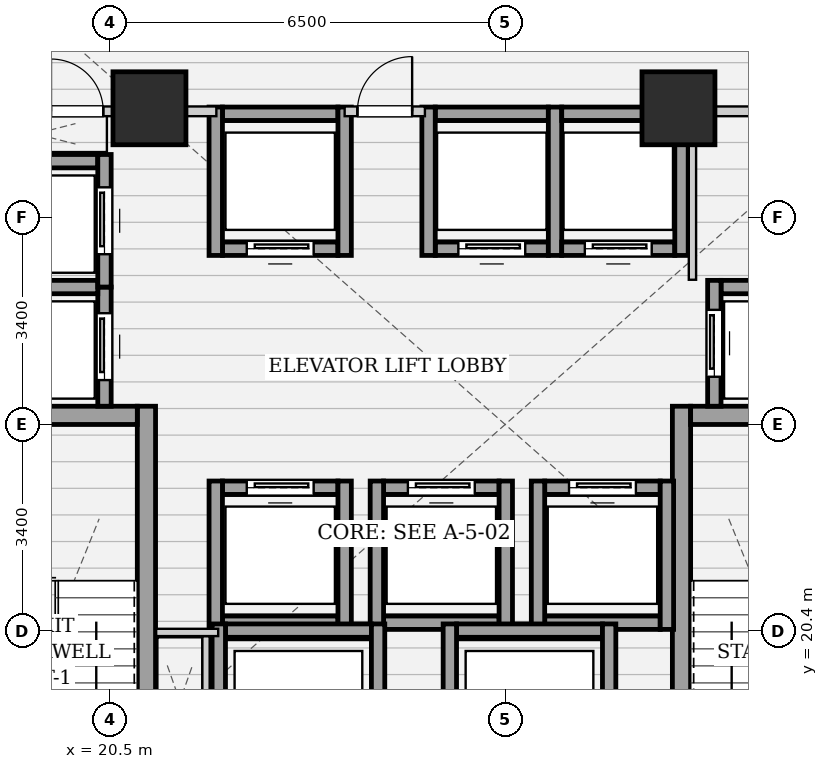
"""IFC4 building model, lengths in metres.
Left out: names, types, materials, properties, quantities, classifications, styles, units other than length and angle.
Written with IfcOpenShell. Run it as: python <this file> out.ifc"""

import sys

from ifc_helpers import new_model, si_unit, direction, frame, frame_2d, origin, origin_2d, place, context, subcontext, project, spatial, rectangle, extrude, element, fill, save


model = new_model("IFC4")
c1 = context("Model", 3, precision=1e-05, world=origin(), true_north=direction((0.0, 1.0)))
c2 = subcontext(c1, "Body", "Model", "MODEL_VIEW")
j1 = project(units=[si_unit("LENGTHUNIT", "METRE"), si_unit("PLANEANGLEUNIT", "RADIAN")], contexts=[c1])
p1 = place(None, origin())
s1 = spatial("IfcSite", under=j1, at=p1, CompositionType="ELEMENT")
p2 = place(p1, origin())
s2 = spatial("IfcBuilding", under=s1, at=p2, CompositionType="ELEMENT")
p3 = place(p2, origin())
s3 = spatial("IfcBuildingStorey", under=s2, at=p3, CompositionType="ELEMENT", Elevation=0.0)
for number, where, z_axis, x_axis in (
    (1, (21.15, 29.0, 0.0), (0.0, 0.0, 1.0), (1.0, 0.0, 0.0)),
    (2, (29.85, 29.0, 0.0), (0.0, 0.0, 1.0), (1.0, 0.0, 0.0)),
):
    element("IfcColumn", number, at=place(p3, frame(where, z_axis=z_axis, x_axis=x_axis)), inside=s3, PredefinedType="COLUMN", context=c2, shape_type="SweptSolid", body=[
        extrude(rectangle(XDim=1.2, YDim=1.2, at=origin_2d()), origin(), (0.0, 0.0, 1.0), 6.0),
    ])
p4 = place(p3, frame((21.1, 15.1, 0.0), z_axis=(0.0, 0.0, 1.0), x_axis=(0.0, 1.0, 0.0)))
e3 = element("IfcWall", 3, at=p4, inside=s3, PredefinedType="SHEAR", context=c2, shape_type="SweptSolid", body=[
    extrude(rectangle(XDim=9.0, YDim=0.3, at=frame_2d((4.5, 0.0))), origin(), (0.0, 0.0, 1.0), 5.68),
])
p5 = place(p3, frame((18.1, 23.95, 0.0), z_axis=(0.0, 0.0, 1.0), x_axis=(1.0, 0.0, 0.0)))
e4 = element("IfcWall", 4, at=p5, inside=s3, PredefinedType="SHEAR", context=c2, shape_type="SweptSolid", body=[
    extrude(rectangle(XDim=2.85, YDim=0.3, at=frame_2d((1.425, 0.0))), origin(), (0.0, 0.0, 1.0), 5.68),
])
p6 = place(p3, frame((29.9, 15.1, 0.0), z_axis=(0.0, 0.0, 1.0), x_axis=(0.0, 1.0, 0.0)))
e5 = element("IfcWall", 5, at=p6, inside=s3, PredefinedType="SHEAR", context=c2, shape_type="SweptSolid", body=[
    extrude(rectangle(XDim=9.0, YDim=0.3, at=frame_2d((4.5, 0.0))), origin(), (0.0, 0.0, 1.0), 5.68),
])
p7 = place(p3, frame((30.05, 23.95, 0.0), z_axis=(0.0, 0.0, 1.0), x_axis=(1.0, 0.0, 0.0)))
e6 = element("IfcWall", 6, at=p7, inside=s3, PredefinedType="SHEAR", context=c2, shape_type="SweptSolid", body=[
    extrude(rectangle(XDim=2.85, YDim=0.3, at=frame_2d((1.425, 0.0))), origin(), (0.0, 0.0, 1.0), 5.68),
])
p8 = place(p3, frame((22.35, 26.69, 0.0), z_axis=(0.0, 0.0, 1.0), x_axis=(1.0, 0.0, 0.0)))
e7 = element("IfcWall", 7, at=p8, inside=s3, PredefinedType="SHEAR", context=c2, shape_type="SweptSolid", body=[
    extrude(rectangle(XDim=1.9, YDim=0.22, at=frame_2d((0.95, 0.0))), origin(), (0.0, 0.0, 1.0), 5.68),
])
p9 = place(p8, frame((0.4, 0.0, 0.0)))
e8 = element("IfcOpeningElement", 8, at=p9, cuts=e7, PredefinedType="OPENING", context=c2, shape_type="SweptSolid", body=[
    extrude(rectangle(XDim=1.1, YDim=2.15, at=frame_2d((0.55, 1.075))), frame((0.0, 0.12, 0.0), z_axis=(0.0, -1.0, 0.0), x_axis=(1.0, 0.0, 0.0)), (0.0, 0.0, 1.0), 0.24),
])
p10 = place(p3, frame((22.35, 28.91, 0.0), z_axis=(0.0, 0.0, 1.0), x_axis=(1.0, 0.0, 0.0)))
e9 = element("IfcWall", 9, at=p10, inside=s3, PredefinedType="SHEAR", context=c2, shape_type="SweptSolid", body=[
    extrude(rectangle(XDim=1.9, YDim=0.22, at=frame_2d((0.95, 0.0))), origin(), (0.0, 0.0, 1.0), 5.68),
])
for number, where, z_axis, x_axis in (
    (10, (22.24, 26.58, 0.0), (0.0, 0.0, 1.0), (0.0, 1.0, 0.0)),
    (11, (24.36, 26.58, 0.0), (0.0, 0.0, 1.0), (0.0, 1.0, 0.0)),
):
    element("IfcWall", number, at=place(p3, frame(where, z_axis=z_axis, x_axis=x_axis)), inside=s3, PredefinedType="SHEAR", context=c2, shape_type="SweptSolid", body=[
        extrude(rectangle(XDim=2.44, YDim=0.22, at=frame_2d((1.22, 0.0))), origin(), (0.0, 0.0, 1.0), 5.68),
    ])
p11 = place(p3, frame((25.85, 26.69, 0.0), z_axis=(0.0, 0.0, 1.0), x_axis=(1.0, 0.0, 0.0)))
e12 = element("IfcWall", 12, at=p11, inside=s3, PredefinedType="SHEAR", context=c2, shape_type="SweptSolid", body=[
    extrude(rectangle(XDim=1.86, YDim=0.22, at=frame_2d((0.93, 0.0))), origin(), (0.0, 0.0, 1.0), 5.68),
])
p12 = place(p11, frame((0.38, 0.0, 0.0)))
e13 = element("IfcOpeningElement", 13, at=p12, cuts=e12, PredefinedType="OPENING", context=c2, shape_type="SweptSolid", body=[
    extrude(rectangle(XDim=1.1, YDim=2.15, at=frame_2d((0.55, 1.075))), frame((0.0, 0.12, 0.0), z_axis=(0.0, -1.0, 0.0), x_axis=(1.0, 0.0, 0.0)), (0.0, 0.0, 1.0), 0.24),
])
p13 = place(p3, frame((25.85, 28.91, 0.0), z_axis=(0.0, 0.0, 1.0), x_axis=(1.0, 0.0, 0.0)))
e14 = element("IfcWall", 14, at=p13, inside=s3, PredefinedType="SHEAR", context=c2, shape_type="SweptSolid", body=[
    extrude(rectangle(XDim=1.86, YDim=0.22, at=frame_2d((0.93, 0.0))), origin(), (0.0, 0.0, 1.0), 5.68),
])
for number, where, z_axis, x_axis in (
    (15, (25.74, 26.58, 0.0), (0.0, 0.0, 1.0), (0.0, 1.0, 0.0)),
    (16, (27.82, 26.58, 0.0), (0.0, 0.0, 1.0), (0.0, 1.0, 0.0)),
):
    element("IfcWall", number, at=place(p3, frame(where, z_axis=z_axis, x_axis=x_axis)), inside=s3, PredefinedType="SHEAR", context=c2, shape_type="SweptSolid", body=[
        extrude(rectangle(XDim=2.44, YDim=0.22, at=frame_2d((1.22, 0.0))), origin(), (0.0, 0.0, 1.0), 5.68),
    ])
p14 = place(p3, frame((27.93, 26.69, 0.0), z_axis=(0.0, 0.0, 1.0), x_axis=(1.0, 0.0, 0.0)))
e17 = element("IfcWall", 17, at=p14, inside=s3, PredefinedType="SHEAR", context=c2, shape_type="SweptSolid", body=[
    extrude(rectangle(XDim=1.86, YDim=0.22, at=frame_2d((0.93, 0.0))), origin(), (0.0, 0.0, 1.0), 5.68),
])
p15 = place(p14, frame((0.38, 0.0, 0.0)))
e18 = element("IfcOpeningElement", 18, at=p15, cuts=e17, PredefinedType="OPENING", context=c2, shape_type="SweptSolid", body=[
    extrude(rectangle(XDim=1.1, YDim=2.15, at=frame_2d((0.55, 1.075))), frame((0.0, 0.12, 0.0), z_axis=(0.0, -1.0, 0.0), x_axis=(1.0, 0.0, 0.0)), (0.0, 0.0, 1.0), 0.24),
])
p16 = place(p3, frame((27.93, 28.91, 0.0), z_axis=(0.0, 0.0, 1.0), x_axis=(1.0, 0.0, 0.0)))
e19 = element("IfcWall", 19, at=p16, inside=s3, PredefinedType="SHEAR", context=c2, shape_type="SweptSolid", body=[
    extrude(rectangle(XDim=1.86, YDim=0.22, at=frame_2d((0.93, 0.0))), origin(), (0.0, 0.0, 1.0), 5.68),
])
p17 = place(p3, frame((29.9, 26.58, 0.0), z_axis=(0.0, 0.0, 1.0), x_axis=(0.0, 1.0, 0.0)))
e20 = element("IfcWall", 20, at=p17, inside=s3, PredefinedType="SHEAR", context=c2, shape_type="SweptSolid", body=[
    extrude(rectangle(XDim=2.44, YDim=0.22, at=frame_2d((1.22, 0.0))), origin(), (0.0, 0.0, 1.0), 5.68),
])
p18 = place(p3, frame((22.35, 20.54, 0.0), z_axis=(0.0, 0.0, 1.0), x_axis=(1.0, 0.0, 0.0)))
e21 = element("IfcWall", 21, at=p18, inside=s3, PredefinedType="SHEAR", context=c2, shape_type="SweptSolid", body=[
    extrude(rectangle(XDim=1.9, YDim=0.22, at=frame_2d((0.95, 0.0))), origin(), (0.0, 0.0, 1.0), 5.68),
])
p19 = place(p3, frame((22.35, 22.76, 0.0), z_axis=(0.0, 0.0, 1.0), x_axis=(1.0, 0.0, 0.0)))
e22 = element("IfcWall", 22, at=p19, inside=s3, PredefinedType="SHEAR", context=c2, shape_type="SweptSolid", body=[
    extrude(rectangle(XDim=1.9, YDim=0.22, at=frame_2d((0.95, 0.0))), origin(), (0.0, 0.0, 1.0), 5.68),
])
p20 = place(p19, frame((0.4, 0.0, 0.0)))
e23 = element("IfcOpeningElement", 23, at=p20, cuts=e22, PredefinedType="OPENING", context=c2, shape_type="SweptSolid", body=[
    extrude(rectangle(XDim=1.1, YDim=2.15, at=frame_2d((0.55, 1.075))), frame((0.0, 0.12, 0.0), z_axis=(0.0, -1.0, 0.0), x_axis=(1.0, 0.0, 0.0)), (0.0, 0.0, 1.0), 0.24),
])
for number, where, z_axis, x_axis in (
    (24, (22.24, 20.43, 0.0), (0.0, 0.0, 1.0), (0.0, 1.0, 0.0)),
    (25, (24.36, 20.43, 0.0), (0.0, 0.0, 1.0), (0.0, 1.0, 0.0)),
):
    element("IfcWall", number, at=place(p3, frame(where, z_axis=z_axis, x_axis=x_axis)), inside=s3, PredefinedType="SHEAR", context=c2, shape_type="SweptSolid", body=[
        extrude(rectangle(XDim=2.44, YDim=0.22, at=frame_2d((1.22, 0.0))), origin(), (0.0, 0.0, 1.0), 5.68),
    ])
p21 = place(p3, frame((25.0, 20.54, 0.0), z_axis=(0.0, 0.0, 1.0), x_axis=(1.0, 0.0, 0.0)))
e26 = element("IfcWall", 26, at=p21, inside=s3, PredefinedType="SHEAR", context=c2, shape_type="SweptSolid", body=[
    extrude(rectangle(XDim=1.9, YDim=0.22, at=frame_2d((0.95, 0.0))), origin(), (0.0, 0.0, 1.0), 5.68),
])
p22 = place(p3, frame((25.0, 22.76, 0.0), z_axis=(0.0, 0.0, 1.0), x_axis=(1.0, 0.0, 0.0)))
e27 = element("IfcWall", 27, at=p22, inside=s3, PredefinedType="SHEAR", context=c2, shape_type="SweptSolid", body=[
    extrude(rectangle(XDim=1.9, YDim=0.22, at=frame_2d((0.95, 0.0))), origin(), (0.0, 0.0, 1.0), 5.68),
])
p23 = place(p22, frame((0.4, 0.0, 0.0)))
e28 = element("IfcOpeningElement", 28, at=p23, cuts=e27, PredefinedType="OPENING", context=c2, shape_type="SweptSolid", body=[
    extrude(rectangle(XDim=1.1, YDim=2.15, at=frame_2d((0.55, 1.075))), frame((0.0, 0.12, 0.0), z_axis=(0.0, -1.0, 0.0), x_axis=(1.0, 0.0, 0.0)), (0.0, 0.0, 1.0), 0.24),
])
for number, where, z_axis, x_axis in (
    (29, (24.89, 20.43, 0.0), (0.0, 0.0, 1.0), (0.0, 1.0, 0.0)),
    (30, (27.01, 20.43, 0.0), (0.0, 0.0, 1.0), (0.0, 1.0, 0.0)),
):
    element("IfcWall", number, at=place(p3, frame(where, z_axis=z_axis, x_axis=x_axis)), inside=s3, PredefinedType="SHEAR", context=c2, shape_type="SweptSolid", body=[
        extrude(rectangle(XDim=2.44, YDim=0.22, at=frame_2d((1.22, 0.0))), origin(), (0.0, 0.0, 1.0), 5.68),
    ])
p24 = place(p3, frame((27.65, 20.54, 0.0), z_axis=(0.0, 0.0, 1.0), x_axis=(1.0, 0.0, 0.0)))
e31 = element("IfcWall", 31, at=p24, inside=s3, PredefinedType="SHEAR", context=c2, shape_type="SweptSolid", body=[
    extrude(rectangle(XDim=1.9, YDim=0.22, at=frame_2d((0.95, 0.0))), origin(), (0.0, 0.0, 1.0), 5.68),
])
p25 = place(p3, frame((27.65, 22.76, 0.0), z_axis=(0.0, 0.0, 1.0), x_axis=(1.0, 0.0, 0.0)))
e32 = element("IfcWall", 32, at=p25, inside=s3, PredefinedType="SHEAR", context=c2, shape_type="SweptSolid", body=[
    extrude(rectangle(XDim=1.9, YDim=0.22, at=frame_2d((0.95, 0.0))), origin(), (0.0, 0.0, 1.0), 5.68),
])
p26 = place(p25, frame((0.4, 0.0, 0.0)))
e33 = element("IfcOpeningElement", 33, at=p26, cuts=e32, PredefinedType="OPENING", context=c2, shape_type="SweptSolid", body=[
    extrude(rectangle(XDim=1.1, YDim=2.15, at=frame_2d((0.55, 1.075))), frame((0.0, 0.12, 0.0), z_axis=(0.0, -1.0, 0.0), x_axis=(1.0, 0.0, 0.0)), (0.0, 0.0, 1.0), 0.24),
])
for number, where, z_axis, x_axis in (
    (34, (27.54, 20.43, 0.0), (0.0, 0.0, 1.0), (0.0, 1.0, 0.0)),
    (35, (29.66, 20.43, 0.0), (0.0, 0.0, 1.0), (0.0, 1.0, 0.0)),
):
    element("IfcWall", number, at=place(p3, frame(where, z_axis=z_axis, x_axis=x_axis)), inside=s3, PredefinedType="SHEAR", context=c2, shape_type="SweptSolid", body=[
        extrude(rectangle(XDim=2.44, YDim=0.22, at=frame_2d((1.22, 0.0))), origin(), (0.0, 0.0, 1.0), 5.68),
    ])
p27 = place(p3, frame((20.41, 24.1, 0.0), z_axis=(0.0, 0.0, 1.0), x_axis=(0.0, 1.0, 0.0)))
e36 = element("IfcWall", 36, at=p27, inside=s3, PredefinedType="SHEAR", context=c2, shape_type="SweptSolid", body=[
    extrude(rectangle(XDim=1.96, YDim=0.22, at=frame_2d((0.98, 0.0))), origin(), (0.0, 0.0, 1.0), 5.68),
])
p28 = place(p27, frame((0.43, 0.0, 0.0)))
e37 = element("IfcOpeningElement", 37, at=p28, cuts=e36, PredefinedType="OPENING", context=c2, shape_type="SweptSolid", body=[
    extrude(rectangle(XDim=1.1, YDim=2.15, at=frame_2d((0.55, 1.075))), frame((0.0, 0.12, 0.0), z_axis=(0.0, -1.0, 0.0), x_axis=(1.0, 0.0, 0.0)), (0.0, 0.0, 1.0), 0.24),
])
for number, where, z_axis, x_axis in (
    (38, (18.4, 26.06, 0.0), (0.0, 0.0, 1.0), (1.0, 0.0, 0.0)),
    (39, (18.4, 28.13, 0.0), (0.0, 0.0, 1.0), (1.0, 0.0, 0.0)),
):
    element("IfcWall", number, at=place(p3, frame(where, z_axis=z_axis, x_axis=x_axis)), inside=s3, PredefinedType="SHEAR", context=c2, shape_type="SweptSolid", body=[
        extrude(rectangle(XDim=1.9, YDim=0.22, at=frame_2d((0.95, 0.0))), origin(), (0.0, 0.0, 1.0), 5.68),
    ])
p29 = place(p3, frame((20.41, 26.06, 0.0), z_axis=(0.0, 0.0, 1.0), x_axis=(0.0, 1.0, 0.0)))
e40 = element("IfcWall", 40, at=p29, inside=s3, PredefinedType="SHEAR", context=c2, shape_type="SweptSolid", body=[
    extrude(rectangle(XDim=2.18, YDim=0.22, at=frame_2d((1.09, 0.0))), origin(), (0.0, 0.0, 1.0), 5.68),
])
p30 = place(p29, frame((0.54, 0.0, 0.0)))
e41 = element("IfcOpeningElement", 41, at=p30, cuts=e40, PredefinedType="OPENING", context=c2, shape_type="SweptSolid", body=[
    extrude(rectangle(XDim=1.1, YDim=2.15, at=frame_2d((0.55, 1.075))), frame((0.0, 0.12, 0.0), z_axis=(0.0, -1.0, 0.0), x_axis=(1.0, 0.0, 0.0)), (0.0, 0.0, 1.0), 0.24),
])
p31 = place(p3, frame((30.55, 26.06, 0.0), z_axis=(0.0, 0.0, 1.0), x_axis=(1.0, 0.0, 0.0)))
e42 = element("IfcWall", 42, at=p31, inside=s3, PredefinedType="SHEAR", context=c2, shape_type="SweptSolid", body=[
    extrude(rectangle(XDim=1.9, YDim=0.22, at=frame_2d((0.95, 0.0))), origin(), (0.0, 0.0, 1.0), 5.68),
])
p32 = place(p3, frame((30.44, 24.1, 0.0), z_axis=(0.0, 0.0, 1.0), x_axis=(0.0, 1.0, 0.0)))
e43 = element("IfcWall", 43, at=p32, inside=s3, PredefinedType="SHEAR", context=c2, shape_type="SweptSolid", body=[
    extrude(rectangle(XDim=2.07, YDim=0.22, at=frame_2d((1.035, 0.0))), origin(), (0.0, 0.0, 1.0), 5.68),
])
p33 = place(p32, frame((0.485, 0.0, 0.0)))
e44 = element("IfcOpeningElement", 44, at=p33, cuts=e43, PredefinedType="OPENING", context=c2, shape_type="SweptSolid", body=[
    extrude(rectangle(XDim=1.1, YDim=2.15, at=frame_2d((0.55, 1.075))), frame((0.0, 0.12, 0.0), z_axis=(0.0, -1.0, 0.0), x_axis=(1.0, 0.0, 0.0)), (0.0, 0.0, 1.0), 0.24),
])
p34 = place(p3, frame((22.4, 20.41, 0.0), z_axis=(0.0, 0.0, 1.0), x_axis=(1.0, 0.0, 0.0)))
e45 = element("IfcWall", 45, at=p34, inside=s3, PredefinedType="SHEAR", context=c2, shape_type="SweptSolid", body=[
    extrude(rectangle(XDim=2.4, YDim=0.22, at=frame_2d((1.2, 0.0))), origin(), (0.0, 0.0, 1.0), 5.68),
])
for number, where, z_axis, x_axis in (
    (46, (22.29, 17.98, 0.0), (0.0, 0.0, 1.0), (0.0, 1.0, 0.0)),
    (47, (24.91, 17.98, 0.0), (0.0, 0.0, 1.0), (0.0, 1.0, 0.0)),
):
    element("IfcWall", number, at=place(p3, frame(where, z_axis=z_axis, x_axis=x_axis)), inside=s3, PredefinedType="SHEAR", context=c2, shape_type="SweptSolid", body=[
        extrude(rectangle(XDim=2.54, YDim=0.22, at=frame_2d((1.27, 0.0))), origin(), (0.0, 0.0, 1.0), 5.68),
    ])
p35 = place(p3, frame((26.2, 20.41, 0.0), z_axis=(0.0, 0.0, 1.0), x_axis=(1.0, 0.0, 0.0)))
e48 = element("IfcWall", 48, at=p35, inside=s3, PredefinedType="SHEAR", context=c2, shape_type="SweptSolid", body=[
    extrude(rectangle(XDim=2.4, YDim=0.22, at=frame_2d((1.2, 0.0))), origin(), (0.0, 0.0, 1.0), 5.68),
])
for number, where, z_axis, x_axis in (
    (49, (26.09, 17.98, 0.0), (0.0, 0.0, 1.0), (0.0, 1.0, 0.0)),
    (50, (28.71, 17.98, 0.0), (0.0, 0.0, 1.0), (0.0, 1.0, 0.0)),
):
    element("IfcWall", number, at=place(p3, frame(where, z_axis=z_axis, x_axis=x_axis)), inside=s3, PredefinedType="SHEAR", context=c2, shape_type="SweptSolid", body=[
        extrude(rectangle(XDim=2.54, YDim=0.22, at=frame_2d((1.27, 0.0))), origin(), (0.0, 0.0, 1.0), 5.68),
    ])
p36 = place(p3, frame((24.36, 28.95, 0.0), z_axis=(0.0, 0.0, 1.0), x_axis=(1.0, 0.0, 0.0)))
e51 = element("IfcWall", 51, at=p36, inside=s3, PredefinedType="PARTITIONING", context=c2, shape_type="SweptSolid", body=[
    extrude(rectangle(XDim=1.32, YDim=0.16, at=frame_2d((0.66, 0.0))), origin(), (0.0, 0.0, 1.0), 5.68),
])
p37 = place(p36, frame((0.21, 0.0, 0.0)))
e52 = element("IfcOpeningElement", 52, at=p37, cuts=e51, PredefinedType="OPENING", context=c2, shape_type="SweptSolid", body=[
    extrude(rectangle(XDim=0.9, YDim=2.05, at=frame_2d((0.45, 1.025))), frame((0.0, 0.09, 0.0), z_axis=(0.0, -1.0, 0.0), x_axis=(1.0, 0.0, 0.0)), (0.0, 0.0, 1.0), 0.18),
])
p38 = place(p3, frame((17.96, 28.95, 0.0), z_axis=(0.0, 0.0, 1.0), x_axis=(1.0, 0.0, 0.0)))
e53 = element("IfcWall", 53, at=p38, inside=s3, PredefinedType="PARTITIONING", context=c2, shape_type="SweptSolid", body=[
    extrude(rectangle(XDim=4.29, YDim=0.16, at=frame_2d((2.145, 0.0))), origin(), (0.0, 0.0, 1.0), 5.68),
])
p39 = place(p38, frame((1.57, 0.0, 0.0)))
e54 = element("IfcOpeningElement", 54, at=p39, cuts=e53, PredefinedType="OPENING", context=c2, shape_type="SweptSolid", body=[
    extrude(rectangle(XDim=0.86, YDim=2.05, at=frame_2d((0.43, 1.025))), frame((0.0, 0.09, 0.0), z_axis=(0.0, -1.0, 0.0), x_axis=(1.0, 0.0, 0.0)), (0.0, 0.0, 1.0), 0.18),
])
p40 = place(p3, frame((22.08, 18.2, 0.0), z_axis=(0.0, 0.0, 1.0), x_axis=(0.0, 1.0, 0.0)))
e55 = element("IfcWall", 55, at=p40, inside=s3, PredefinedType="PARTITIONING", context=c2, shape_type="SweptSolid", body=[
    extrude(rectangle(XDim=2.12, YDim=0.12, at=frame_2d((1.06, 0.0))), origin(), (0.0, 0.0, 1.0), 5.68),
])
p41 = place(p3, frame((22.28, 20.38, 0.0), z_axis=(0.0, 0.0, 1.0), x_axis=(-1.0, 0.0, 0.0)))
e56 = element("IfcWall", 56, at=p41, inside=s3, PredefinedType="PARTITIONING", context=c2, shape_type="SweptSolid", body=[
    extrude(rectangle(XDim=1.02, YDim=0.12, at=frame_2d((0.51, 0.0))), origin(), (0.0, 0.0, 1.0), 5.68),
])
p42 = place(p3, frame((30.08, 26.18, 0.0), z_axis=(0.0, 0.0, 1.0), x_axis=(0.0, 1.0, 0.0)))
e57 = element("IfcWall", 57, at=p42, inside=s3, PredefinedType="PARTITIONING", context=c2, shape_type="SweptSolid", body=[
    extrude(rectangle(XDim=2.68, YDim=0.12, at=frame_2d((1.34, 0.0))), origin(), (0.0, 0.0, 1.0), 5.68),
])
p43 = place(p3, frame((30.08, 28.95, 0.0), z_axis=(0.0, 0.0, 1.0), x_axis=(1.0, 0.0, 0.0)))
e58 = element("IfcWall", 58, at=p43, inside=s3, PredefinedType="PARTITIONING", context=c2, shape_type="SweptSolid", body=[
    extrude(rectangle(XDim=2.96, YDim=0.16, at=frame_2d((1.48, 0.0))), origin(), (0.0, 0.0, 1.0), 5.68),
])
p44 = place(p43, frame((1.045, 0.0, 0.0)))
e59 = element("IfcOpeningElement", 59, at=p44, cuts=e58, PredefinedType="OPENING", context=c2, shape_type="SweptSolid", body=[
    extrude(rectangle(XDim=0.86, YDim=2.05, at=frame_2d((0.43, 1.025))), frame((0.0, 0.09, 0.0), z_axis=(0.0, -1.0, 0.0), x_axis=(1.0, 0.0, 0.0)), (0.0, 0.0, 1.0), 0.18),
])
p45 = place(p9, origin())
e60 = element("IfcDoor", 60, at=p45, inside=s3, OperationType="SLIDING_TO_LEFT", PredefinedType="DOOR", context=c2, shape_type="SweptSolid", body=[
    extrude(rectangle(XDim=1.1, YDim=2.15, at=frame_2d((0.55, 1.075))), frame((0.0, 0.025, 0.0), z_axis=(0.0, -1.0, 0.0), x_axis=(1.0, 0.0, 0.0)), (0.0, 0.0, 1.0), 0.05),
])
fill(e8, e60)
p46 = place(p12, origin())
e61 = element("IfcDoor", 61, at=p46, inside=s3, OperationType="SLIDING_TO_LEFT", PredefinedType="DOOR", context=c2, shape_type="SweptSolid", body=[
    extrude(rectangle(XDim=1.1, YDim=2.15, at=frame_2d((0.55, 1.075))), frame((0.0, 0.025, 0.0), z_axis=(0.0, -1.0, 0.0), x_axis=(1.0, 0.0, 0.0)), (0.0, 0.0, 1.0), 0.05),
])
fill(e13, e61)
p47 = place(p15, origin())
e62 = element("IfcDoor", 62, at=p47, inside=s3, OperationType="SLIDING_TO_LEFT", PredefinedType="DOOR", context=c2, shape_type="SweptSolid", body=[
    extrude(rectangle(XDim=1.1, YDim=2.15, at=frame_2d((0.55, 1.075))), frame((0.0, 0.025, 0.0), z_axis=(0.0, -1.0, 0.0), x_axis=(1.0, 0.0, 0.0)), (0.0, 0.0, 1.0), 0.05),
])
fill(e18, e62)
p48 = place(p20, origin())
e63 = element("IfcDoor", 63, at=p48, inside=s3, OperationType="SLIDING_TO_LEFT", PredefinedType="DOOR", context=c2, shape_type="SweptSolid", body=[
    extrude(rectangle(XDim=1.1, YDim=2.15, at=frame_2d((0.55, 1.075))), frame((0.0, 0.025, 0.0), z_axis=(0.0, -1.0, 0.0), x_axis=(1.0, 0.0, 0.0)), (0.0, 0.0, 1.0), 0.05),
])
fill(e23, e63)
p49 = place(p23, origin())
e64 = element("IfcDoor", 64, at=p49, inside=s3, OperationType="SLIDING_TO_LEFT", PredefinedType="DOOR", context=c2, shape_type="SweptSolid", body=[
    extrude(rectangle(XDim=1.1, YDim=2.15, at=frame_2d((0.55, 1.075))), frame((0.0, 0.025, 0.0), z_axis=(0.0, -1.0, 0.0), x_axis=(1.0, 0.0, 0.0)), (0.0, 0.0, 1.0), 0.05),
])
fill(e28, e64)
p50 = place(p26, origin())
e65 = element("IfcDoor", 65, at=p50, inside=s3, OperationType="SLIDING_TO_LEFT", PredefinedType="DOOR", context=c2, shape_type="SweptSolid", body=[
    extrude(rectangle(XDim=1.1, YDim=2.15, at=frame_2d((0.55, 1.075))), frame((0.0, 0.025, 0.0), z_axis=(0.0, -1.0, 0.0), x_axis=(1.0, 0.0, 0.0)), (0.0, 0.0, 1.0), 0.05),
])
fill(e33, e65)
p51 = place(p28, origin())
e66 = element("IfcDoor", 66, at=p51, inside=s3, OperationType="SLIDING_TO_LEFT", PredefinedType="DOOR", context=c2, shape_type="SweptSolid", body=[
    extrude(rectangle(XDim=1.1, YDim=2.15, at=frame_2d((0.55, 1.075))), frame((0.0, 0.025, 0.0), z_axis=(0.0, -1.0, 0.0), x_axis=(1.0, 0.0, 0.0)), (0.0, 0.0, 1.0), 0.05),
])
fill(e37, e66)
p52 = place(p30, origin())
e67 = element("IfcDoor", 67, at=p52, inside=s3, OperationType="SLIDING_TO_LEFT", PredefinedType="DOOR", context=c2, shape_type="SweptSolid", body=[
    extrude(rectangle(XDim=1.1, YDim=2.15, at=frame_2d((0.55, 1.075))), frame((0.0, 0.025, 0.0), z_axis=(0.0, -1.0, 0.0), x_axis=(1.0, 0.0, 0.0)), (0.0, 0.0, 1.0), 0.05),
])
fill(e41, e67)
p53 = place(p33, origin())
e68 = element("IfcDoor", 68, at=p53, inside=s3, OperationType="SLIDING_TO_LEFT", PredefinedType="DOOR", context=c2, shape_type="SweptSolid", body=[
    extrude(rectangle(XDim=1.1, YDim=2.15, at=frame_2d((0.55, 1.075))), frame((0.0, 0.025, 0.0), z_axis=(0.0, -1.0, 0.0), x_axis=(1.0, 0.0, 0.0)), (0.0, 0.0, 1.0), 0.05),
])
fill(e44, e68)
p54 = place(p37, origin())
e69 = element("IfcDoor", 69, at=p54, inside=s3, OperationType="SINGLE_SWING_RIGHT", PredefinedType="DOOR", context=c2, shape_type="SweptSolid", body=[
    extrude(rectangle(XDim=0.9, YDim=2.05, at=frame_2d((0.45, 1.025))), frame((0.0, 0.025, 0.0), z_axis=(0.0, -1.0, 0.0), x_axis=(1.0, 0.0, 0.0)), (0.0, 0.0, 1.0), 0.05),
])
fill(e52, e69)
p55 = place(p39, origin())
e70 = element("IfcDoor", 70, at=p55, inside=s3, OperationType="SINGLE_SWING_LEFT", PredefinedType="DOOR", context=c2, shape_type="SweptSolid", body=[
    extrude(rectangle(XDim=0.86, YDim=2.05, at=frame_2d((0.43, 1.025))), frame((0.0, 0.025, 0.0), z_axis=(0.0, -1.0, 0.0), x_axis=(1.0, 0.0, 0.0)), (0.0, 0.0, 1.0), 0.05),
])
fill(e54, e70)
save(model, sys.argv[1])
